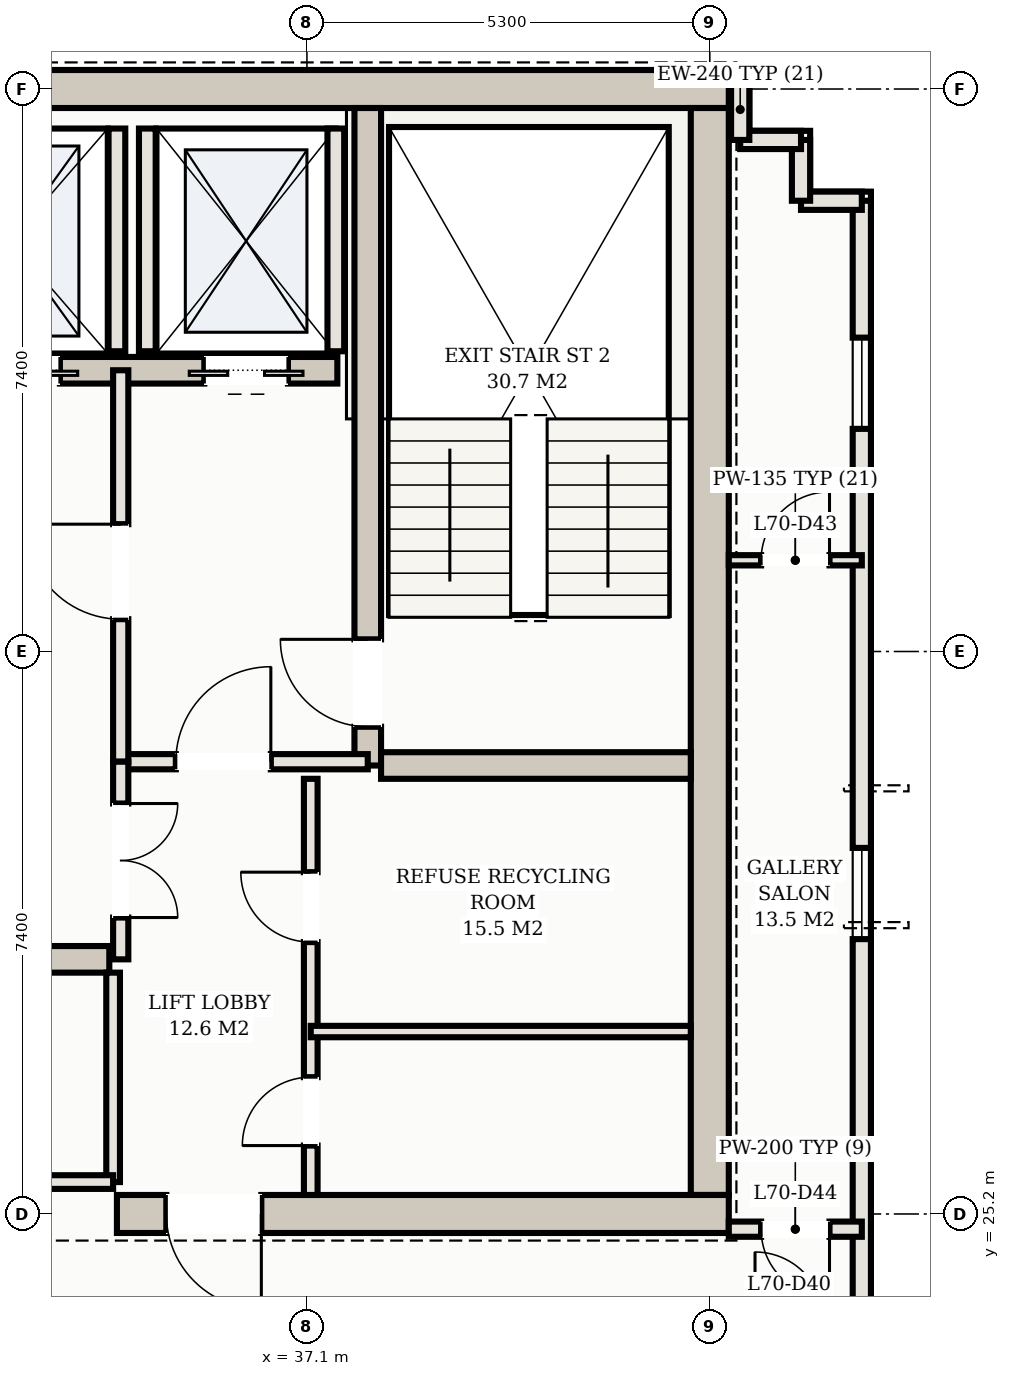
"""IFC4 building model, lengths in metres.
Left out: names, types, materials, properties, quantities, classifications, styles, units other than length and angle.
Written with IfcOpenShell. Run it as: python <this file> out.ifc"""

import sys

from ifc_helpers import new_model, si_unit, direction, frame, frame_2d, origin, place, context, subcontext, project, spatial, rectangle, extrude, element, fill, save


model = new_model("IFC4")
c1 = context("Model", 3, precision=1e-05, world=origin(), true_north=direction((0.0, 1.0)))
c2 = subcontext(c1, "Body", "Model", "MODEL_VIEW")
j1 = project(units=[si_unit("LENGTHUNIT", "METRE"), si_unit("PLANEANGLEUNIT", "RADIAN")], contexts=[c1])
p1 = place(None, origin())
s1 = spatial("IfcSite", under=j1, at=p1, CompositionType="ELEMENT")
p2 = place(p1, origin())
s2 = spatial("IfcBuilding", under=s1, at=p2, CompositionType="ELEMENT")
p3 = place(p2, frame((0.0, 0.0, 252.8)))
s3 = spatial("IfcBuildingStorey", under=s2, at=p3, CompositionType="ELEMENT", Elevation=252.8)
p4 = place(p3, frame((10.35, 40.0, 0.0), z_axis=(0.0, 0.0, 1.0), x_axis=(1.0, 0.0, 0.0)))
e1 = element("IfcWall", 1, at=p4, inside=s3, PredefinedType="SHEAR", context=c2, shape_type="SweptSolid", body=[
    extrude(rectangle(XDim=32.3, YDim=0.5, at=frame_2d((16.15, 0.0))), origin(), (0.0, 0.0, 1.0), 3.11),
])
p5 = place(p3, frame((42.4, 25.45, 0.0), z_axis=(0.0, 0.0, 1.0), x_axis=(0.0, 1.0, 0.0)))
e2 = element("IfcWall", 2, at=p5, inside=s3, PredefinedType="SHEAR", context=c2, shape_type="SweptSolid", body=[
    extrude(rectangle(XDim=14.3, YDim=0.5, at=frame_2d((7.15, 0.0))), origin(), (0.0, 0.0, 1.0), 3.11),
])
p6 = place(p3, frame((34.6, 25.2, 0.0), z_axis=(0.0, 0.0, 1.0), x_axis=(1.0, 0.0, 0.0)))
e3 = element("IfcWall", 3, at=p6, inside=s3, PredefinedType="SHEAR", context=c2, shape_type="SweptSolid", body=[
    extrude(rectangle(XDim=8.05, YDim=0.5, at=frame_2d((4.025, 0.0))), origin(), (0.0, 0.0, 1.0), 3.11),
])
p7 = place(p6, frame((0.65, 0.0, 0.0)))
e4 = element("IfcOpeningElement", 4, at=p7, cuts=e3, PredefinedType="OPENING", context=c2, shape_type="SweptSolid", body=[
    extrude(rectangle(XDim=1.25, YDim=2.2, at=frame_2d((0.625, 1.1))), frame((0.0, 0.26, 0.0), z_axis=(0.0, -1.0, 0.0), x_axis=(1.0, 0.0, 0.0)), (0.0, 0.0, 1.0), 0.52),
])
p8 = place(p3, frame((37.9, 31.1, 0.0), z_axis=(0.0, 0.0, 1.0), x_axis=(0.0, 1.0, 0.0)))
e5 = element("IfcWall", 5, at=p8, inside=s3, PredefinedType="SHEAR", context=c2, shape_type="SweptSolid", body=[
    extrude(rectangle(XDim=8.65, YDim=0.35, at=frame_2d((4.325, 0.0))), origin(), (0.0, 0.0, 1.0), 3.11),
])
p9 = place(p8, frame((0.51, 0.0, 0.0)))
e6 = element("IfcOpeningElement", 6, at=p9, cuts=e5, PredefinedType="OPENING", context=c2, shape_type="SweptSolid", body=[
    extrude(rectangle(XDim=1.15, YDim=2.2, at=frame_2d((0.575, 1.1))), frame((0.0, 0.185, 0.0), z_axis=(0.0, -1.0, 0.0), x_axis=(1.0, 0.0, 0.0)), (0.0, 0.0, 1.0), 0.37),
])
p10 = place(p3, frame((38.075, 31.1, 0.0), z_axis=(0.0, 0.0, 1.0), x_axis=(1.0, 0.0, 0.0)))
e7 = element("IfcWall", 7, at=p10, inside=s3, PredefinedType="SHEAR", context=c2, shape_type="SweptSolid", body=[
    extrude(rectangle(XDim=4.075, YDim=0.35, at=frame_2d((2.038, 0.0))), origin(), (0.0, 0.0, 1.0), 3.11),
])
p11 = place(p3, frame((15.5, 36.3, 0.0), z_axis=(0.0, 0.0, 1.0), x_axis=(1.0, 0.0, 0.0)))
e8 = element("IfcWall", 8, at=p11, inside=s3, PredefinedType="SHEAR", context=c2, shape_type="SweptSolid", body=[
    extrude(rectangle(XDim=22.0, YDim=0.35, at=frame_2d((11.0, 0.0))), origin(), (0.0, 0.0, 1.0), 3.11),
])
p12 = place(p11, frame((0.65, 0.0, 0.0)))
e9 = element("IfcOpeningElement", 9, at=p12, cuts=e8, PredefinedType="OPENING", context=c2, shape_type="SweptSolid", body=[
    extrude(rectangle(XDim=1.1, YDim=2.15, at=frame_2d((0.55, 1.075))), frame((0.0, 0.185, 0.0), z_axis=(0.0, -1.0, 0.0), x_axis=(1.0, 0.0, 0.0)), (0.0, 0.0, 1.0), 0.37),
])
p13 = place(p11, frame((20.25, 0.0, 0.0)))
e10 = element("IfcOpeningElement", 10, at=p13, cuts=e8, PredefinedType="OPENING", context=c2, shape_type="SweptSolid", body=[
    extrude(rectangle(XDim=1.1, YDim=2.15, at=frame_2d((0.55, 1.075))), frame((0.0, 0.185, 0.0), z_axis=(0.0, -1.0, 0.0), x_axis=(1.0, 0.0, 0.0)), (0.0, 0.0, 1.0), 0.37),
])
p14 = place(p11, frame((17.05, 0.0, 0.0)))
e11 = element("IfcOpeningElement", 11, at=p14, cuts=e8, PredefinedType="OPENING", context=c2, shape_type="SweptSolid", body=[
    extrude(rectangle(XDim=1.3, YDim=2.2, at=frame_2d((0.65, 1.1))), frame((0.0, 0.185, 0.0), z_axis=(0.0, -1.0, 0.0), x_axis=(1.0, 0.0, 0.0)), (0.0, 0.0, 1.0), 0.37),
])
p15 = place(p11, frame((3.95, 0.0, 0.0)))
e12 = element("IfcOpeningElement", 12, at=p15, cuts=e8, PredefinedType="OPENING", context=c2, shape_type="SweptSolid", body=[
    extrude(rectangle(XDim=1.1, YDim=2.15, at=frame_2d((0.55, 1.075))), frame((0.0, 0.185, 0.0), z_axis=(0.0, -1.0, 0.0), x_axis=(1.0, 0.0, 0.0)), (0.0, 0.0, 1.0), 0.37),
])
p16 = place(p11, frame((6.55, 0.0, 0.0)))
e13 = element("IfcOpeningElement", 13, at=p16, cuts=e8, PredefinedType="OPENING", context=c2, shape_type="SweptSolid", body=[
    extrude(rectangle(XDim=1.1, YDim=2.15, at=frame_2d((0.55, 1.075))), frame((0.0, 0.185, 0.0), z_axis=(0.0, -1.0, 0.0), x_axis=(1.0, 0.0, 0.0)), (0.0, 0.0, 1.0), 0.37),
])
p17 = place(p11, frame((9.15, 0.0, 0.0)))
e14 = element("IfcOpeningElement", 14, at=p17, cuts=e8, PredefinedType="OPENING", context=c2, shape_type="SweptSolid", body=[
    extrude(rectangle(XDim=1.1, YDim=2.15, at=frame_2d((0.55, 1.075))), frame((0.0, 0.185, 0.0), z_axis=(0.0, -1.0, 0.0), x_axis=(1.0, 0.0, 0.0)), (0.0, 0.0, 1.0), 0.37),
])
p18 = place(p3, frame((18.5, 28.55, 0.0), z_axis=(0.0, 0.0, 1.0), x_axis=(1.0, 0.0, 0.0)))
e15 = element("IfcWall", 15, at=p18, inside=s3, PredefinedType="SHEAR", context=c2, shape_type="SweptSolid", body=[
    extrude(rectangle(XDim=16.0, YDim=0.35, at=frame_2d((8.0, 0.0))), origin(), (0.0, 0.0, 1.0), 3.11),
])
for number, where, z_axis, x_axis in (
    (16, (35.0, 36.55, 0.0), (0.0, 0.0, 1.0), (0.0, 1.0, 0.0)),
    (17, (37.48, 36.55, 0.0), (0.0, 0.0, 1.0), (0.0, 1.0, 0.0)),
    (18, (34.6, 36.55, 0.0), (0.0, 0.0, 1.0), (0.0, 1.0, 0.0)),
):
    element("IfcWall", number, at=place(p3, frame(where, z_axis=z_axis, x_axis=x_axis)), inside=s3, PredefinedType="SOLIDWALL", context=c2, shape_type="SweptSolid", body=[
        extrude(rectangle(XDim=2.93, YDim=0.22, at=frame_2d((1.465, 0.0))), origin(), (0.0, 0.0, 1.0), 3.11),
    ])
p19 = place(p3, frame((44.4, 12.52, 0.0), z_axis=(0.0, 0.0, 1.0), x_axis=(0.0, 1.0, 0.0)))
e19 = element("IfcWall", 19, at=p19, inside=s3, PredefinedType="SOLIDWALL", context=c2, shape_type="SweptSolid", body=[
    extrude(rectangle(XDim=26.01, YDim=0.24, at=frame_2d((13.005, 0.0))), origin(), (0.0, 0.0, 1.0), 3.11),
])
p20 = place(p19, frame((4.48, 0.0, 0.0)))
e20 = element("IfcOpeningElement", 20, at=p20, cuts=e19, PredefinedType="OPENING", context=c2, shape_type="SweptSolid", body=[
    extrude(rectangle(XDim=1.8, YDim=2.2, at=frame_2d((0.9, 1.1))), frame((0.0, 0.13, 0.0), z_axis=(0.0, -1.0, 0.0), x_axis=(1.0, 0.0, 0.0)), (0.0, 0.0, 1.0), 0.26),
])
p21 = place(p19, frame((0.426, 0.0, 0.75)))
e21 = element("IfcOpeningElement", 21, at=p21, cuts=e19, PredefinedType="OPENING", context=c2, shape_type="SweptSolid", body=[
    extrude(rectangle(XDim=1.5, YDim=1.6, at=frame_2d((0.75, 0.8))), frame((0.0, 0.13, 0.0), z_axis=(0.0, -1.0, 0.0), x_axis=(1.0, 0.0, 0.0)), (0.0, 0.0, 1.0), 0.26),
])
p22 = place(p19, frame((2.784, 0.0, 0.75)))
e22 = element("IfcOpeningElement", 22, at=p22, cuts=e19, PredefinedType="OPENING", context=c2, shape_type="SweptSolid", body=[
    extrude(rectangle(XDim=1.2, YDim=1.5, at=frame_2d((0.6, 0.75))), frame((0.0, 0.13, 0.0), z_axis=(0.0, -1.0, 0.0), x_axis=(1.0, 0.0, 0.0)), (0.0, 0.0, 1.0), 0.26),
])
p23 = place(p19, frame((8.16, 0.0, 0.75)))
e23 = element("IfcOpeningElement", 23, at=p23, cuts=e19, PredefinedType="OPENING", context=c2, shape_type="SweptSolid", body=[
    extrude(rectangle(XDim=1.2, YDim=1.5, at=frame_2d((0.6, 0.75))), frame((0.0, 0.13, 0.0), z_axis=(0.0, -1.0, 0.0), x_axis=(1.0, 0.0, 0.0)), (0.0, 0.0, 1.0), 0.26),
])
p24 = place(p19, frame((16.296, 0.0, 0.75)))
e24 = element("IfcOpeningElement", 24, at=p24, cuts=e19, PredefinedType="OPENING", context=c2, shape_type="SweptSolid", body=[
    extrude(rectangle(XDim=1.2, YDim=1.5, at=frame_2d((0.6, 0.75))), frame((0.0, 0.13, 0.0), z_axis=(0.0, -1.0, 0.0), x_axis=(1.0, 0.0, 0.0)), (0.0, 0.0, 1.0), 0.26),
])
p25 = place(p19, frame((23.009, 0.0, 0.75)))
e25 = element("IfcOpeningElement", 25, at=p25, cuts=e19, PredefinedType="OPENING", context=c2, shape_type="SweptSolid", body=[
    extrude(rectangle(XDim=1.2, YDim=1.5, at=frame_2d((0.6, 0.75))), frame((0.0, 0.13, 0.0), z_axis=(0.0, -1.0, 0.0), x_axis=(1.0, 0.0, 0.0)), (0.0, 0.0, 1.0), 0.26),
])
p26 = place(p3, frame((44.4, 38.53, 0.0), z_axis=(0.0, 0.0, 1.0), x_axis=(-1.0, 0.0, 0.0)))
e26 = element("IfcWall", 26, at=p26, inside=s3, PredefinedType="SOLIDWALL", context=c2, shape_type="SweptSolid", body=[
    extrude(rectangle(XDim=0.8, YDim=0.24, at=frame_2d((0.4, 0.0))), origin(), (0.0, 0.0, 1.0), 3.11),
])
for number, where, z_axis, x_axis in (
    (27, (43.6, 38.53, 0.0), (0.0, 0.0, 1.0), (0.0, 1.0, 0.0)),
    (28, (43.6, 39.33, 0.0), (0.0, 0.0, 1.0), (-1.0, 0.0, 0.0)),
):
    element("IfcWall", number, at=place(p3, frame(where, z_axis=z_axis, x_axis=x_axis)), inside=s3, PredefinedType="SOLIDWALL", context=c2, shape_type="SweptSolid", body=[
        extrude(rectangle(XDim=0.8, YDim=0.24, at=frame_2d((0.4, 0.0))), origin(), (0.0, 0.0, 1.0), 3.11),
    ])
p27 = place(p3, frame((42.8, 39.33, 0.0), z_axis=(0.0, 0.0, 1.0), x_axis=(0.0, 1.0, 0.0)))
e29 = element("IfcWall", 29, at=p27, inside=s3, PredefinedType="SOLIDWALL", context=c2, shape_type="SweptSolid", body=[
    extrude(rectangle(XDim=0.8, YDim=0.24, at=frame_2d((0.4, 0.0))), origin(), (0.0, 0.0, 1.0), 3.11),
])
p28 = place(p3, frame((34.65, 31.15, 0.0), z_axis=(0.0, 0.0, 1.0), x_axis=(1.0, 0.0, 0.0)))
e30 = element("IfcWall", 30, at=p28, inside=s3, PredefinedType="PARTITIONING", context=c2, shape_type="SweptSolid", body=[
    extrude(rectangle(XDim=3.25, YDim=0.2, at=frame_2d((1.625, 0.0))), origin(), (0.0, 0.0, 1.0), 2.45),
])
p29 = place(p28, frame((0.725, 0.0, 0.0)))
e31 = element("IfcOpeningElement", 31, at=p29, cuts=e30, PredefinedType="OPENING", context=c2, shape_type="SweptSolid", body=[
    extrude(rectangle(XDim=1.25, YDim=2.2, at=frame_2d((0.625, 1.1))), frame((0.0, 0.11, 0.0), z_axis=(0.0, -1.0, 0.0), x_axis=(1.0, 0.0, 0.0)), (0.0, 0.0, 1.0), 0.22),
])
p30 = place(p3, frame((34.65, 31.15, 0.0), z_axis=(0.0, 0.0, 1.0), x_axis=(0.0, 1.0, 0.0)))
e32 = element("IfcWall", 32, at=p30, inside=s3, PredefinedType="PARTITIONING", context=c2, shape_type="SweptSolid", body=[
    extrude(rectangle(XDim=5.15, YDim=0.2, at=frame_2d((2.575, 0.0))), origin(), (0.0, 0.0, 1.0), 2.45),
])
p31 = place(p30, frame((1.875, 0.0, 0.0)))
e33 = element("IfcOpeningElement", 33, at=p31, cuts=e32, PredefinedType="OPENING", context=c2, shape_type="SweptSolid", body=[
    extrude(rectangle(XDim=1.25, YDim=2.2, at=frame_2d((0.625, 1.1))), frame((0.0, 0.11, 0.0), z_axis=(0.0, -1.0, 0.0), x_axis=(1.0, 0.0, 0.0)), (0.0, 0.0, 1.0), 0.22),
])
p32 = place(p3, frame((37.15, 25.45, 0.0), z_axis=(0.0, 0.0, 1.0), x_axis=(0.0, 1.0, 0.0)))
e34 = element("IfcWall", 34, at=p32, inside=s3, PredefinedType="PARTITIONING", context=c2, shape_type="SweptSolid", body=[
    extrude(rectangle(XDim=5.475, YDim=0.18, at=frame_2d((2.738, 0.0))), origin(), (0.0, 0.0, 1.0), 2.45),
])
p33 = place(p32, frame((0.65, 0.0, 0.0)))
e35 = element("IfcOpeningElement", 35, at=p33, cuts=e34, PredefinedType="OPENING", context=c2, shape_type="SweptSolid", body=[
    extrude(rectangle(XDim=0.9, YDim=2.15, at=frame_2d((0.45, 1.075))), frame((0.0, 0.1, 0.0), z_axis=(0.0, -1.0, 0.0), x_axis=(1.0, 0.0, 0.0)), (0.0, 0.0, 1.0), 0.2),
])
p34 = place(p32, frame((3.327, 0.0, 0.0)))
e36 = element("IfcOpeningElement", 36, at=p34, cuts=e34, PredefinedType="OPENING", context=c2, shape_type="SweptSolid", body=[
    extrude(rectangle(XDim=0.92, YDim=2.15, at=frame_2d((0.46, 1.075))), frame((0.0, 0.1, 0.0), z_axis=(0.0, -1.0, 0.0), x_axis=(1.0, 0.0, 0.0)), (0.0, 0.0, 1.0), 0.2),
])
p35 = place(p3, frame((37.15, 27.6, 0.0), z_axis=(0.0, 0.0, 1.0), x_axis=(1.0, 0.0, 0.0)))
e37 = element("IfcWall", 37, at=p35, inside=s3, PredefinedType="PARTITIONING", context=c2, shape_type="SweptSolid", body=[
    extrude(rectangle(XDim=5.0, YDim=0.15, at=frame_2d((2.5, 0.0))), origin(), (0.0, 0.0, 1.0), 2.45),
])
p36 = place(p3, frame((34.65, 28.55, 0.0), z_axis=(0.0, 0.0, 1.0), x_axis=(0.0, 1.0, 0.0)))
e38 = element("IfcWall", 38, at=p36, inside=s3, PredefinedType="PARTITIONING", context=c2, shape_type="SweptSolid", body=[
    extrude(rectangle(XDim=2.6, YDim=0.2, at=frame_2d((1.3, 0.0))), origin(), (0.0, 0.0, 1.0), 2.45),
])
p37 = place(p36, frame((0.55, 0.0, 0.0)))
e39 = element("IfcOpeningElement", 39, at=p37, cuts=e38, PredefinedType="OPENING", context=c2, shape_type="SweptSolid", body=[
    extrude(rectangle(XDim=1.5, YDim=2.25, at=frame_2d((0.75, 1.125))), frame((0.0, 0.11, 0.0), z_axis=(0.0, -1.0, 0.0), x_axis=(1.0, 0.0, 0.0)), (0.0, 0.0, 1.0), 0.22),
])
p38 = place(p3, frame((34.55, 25.62, 0.0), z_axis=(0.0, 0.0, 1.0), x_axis=(0.0, 1.0, 0.0)))
e40 = element("IfcWall", 40, at=p38, inside=s3, PredefinedType="PARTITIONING", context=c2, shape_type="SweptSolid", body=[
    extrude(rectangle(XDim=2.755, YDim=0.18, at=frame_2d((1.377, 0.0))), origin(), (0.0, 0.0, 1.0), 2.45),
])
p39 = place(p3, frame((26.65, 25.62, 0.0), z_axis=(0.0, 0.0, 1.0), x_axis=(1.0, 0.0, 0.0)))
e41 = element("IfcWall", 41, at=p39, inside=s3, PredefinedType="PARTITIONING", context=c2, shape_type="SweptSolid", body=[
    extrude(rectangle(XDim=7.9, YDim=0.18, at=frame_2d((3.95, 0.0))), origin(), (0.0, 0.0, 1.0), 2.45),
])
p40 = place(p39, frame((3.34, 0.0, 0.0)))
e42 = element("IfcOpeningElement", 42, at=p40, cuts=e41, PredefinedType="OPENING", context=c2, shape_type="SweptSolid", body=[
    extrude(rectangle(XDim=0.92, YDim=2.15, at=frame_2d((0.46, 1.075))), frame((0.0, 0.1, 0.0), z_axis=(0.0, -1.0, 0.0), x_axis=(1.0, 0.0, 0.0)), (0.0, 0.0, 1.0), 0.2),
])
p41 = place(p3, frame((42.65, 25.0, 0.0), z_axis=(0.0, 0.0, 1.0), x_axis=(1.0, 0.0, 0.0)))
e43 = element("IfcWall", 43, at=p41, inside=s3, PredefinedType="PARTITIONING", context=c2, shape_type="SweptSolid", body=[
    extrude(rectangle(XDim=1.75, YDim=0.2, at=frame_2d((0.875, 0.0))), origin(), (0.0, 0.0, 1.0), 2.45),
])
p42 = place(p41, frame((0.425, 0.0, 0.0)))
e44 = element("IfcOpeningElement", 44, at=p42, cuts=e43, PredefinedType="OPENING", context=c2, shape_type="SweptSolid", body=[
    extrude(rectangle(XDim=0.9, YDim=2.15, at=frame_2d((0.45, 1.075))), frame((0.0, 0.11, 0.0), z_axis=(0.0, -1.0, 0.0), x_axis=(1.0, 0.0, 0.0)), (0.0, 0.0, 1.0), 0.22),
])
p43 = place(p3, frame((42.65, 33.8, 0.0), z_axis=(0.0, 0.0, 1.0), x_axis=(1.0, 0.0, 0.0)))
e45 = element("IfcWall", 45, at=p43, inside=s3, PredefinedType="PARTITIONING", context=c2, shape_type="SweptSolid", body=[
    extrude(rectangle(XDim=1.75, YDim=0.135, at=frame_2d((0.875, 0.0))), origin(), (0.0, 0.0, 1.0), 2.45),
])
p44 = place(p43, frame((0.425, 0.0, 0.0)))
e46 = element("IfcOpeningElement", 46, at=p44, cuts=e45, PredefinedType="OPENING", context=c2, shape_type="SweptSolid", body=[
    extrude(rectangle(XDim=0.9, YDim=2.15, at=frame_2d((0.45, 1.075))), frame((0.0, 0.078, 0.0), z_axis=(0.0, -1.0, 0.0), x_axis=(1.0, 0.0, 0.0)), (0.0, 0.0, 1.0), 0.155),
])
p45 = place(p13, frame((1.1, 0.0, 0.0), z_axis=(0.0, 0.0, 1.0), x_axis=(-1.0, 0.0, 0.0)))
e47 = element("IfcDoor", 47, at=p45, inside=s3, OperationType="DOUBLE_DOOR_SLIDING", PredefinedType="DOOR", context=c2, shape_type="SweptSolid", body=[
    extrude(rectangle(XDim=1.1, YDim=2.15, at=frame_2d((0.55, 1.075))), frame((0.0, 0.025, 0.0), z_axis=(0.0, -1.0, 0.0), x_axis=(1.0, 0.0, 0.0)), (0.0, 0.0, 1.0), 0.05),
])
fill(e10, e47)
p46 = place(p14, frame((1.3, 0.0, 0.0), z_axis=(0.0, 0.0, 1.0), x_axis=(-1.0, 0.0, 0.0)))
e48 = element("IfcDoor", 48, at=p46, inside=s3, OperationType="DOUBLE_DOOR_SLIDING", PredefinedType="DOOR", context=c2, shape_type="SweptSolid", body=[
    extrude(rectangle(XDim=1.3, YDim=2.2, at=frame_2d((0.65, 1.1))), frame((0.0, 0.025, 0.0), z_axis=(0.0, -1.0, 0.0), x_axis=(1.0, 0.0, 0.0)), (0.0, 0.0, 1.0), 0.05),
])
fill(e11, e48)
p47 = place(p7, frame((1.25, 0.0, 0.0), z_axis=(0.0, 0.0, 1.0), x_axis=(-1.0, 0.0, 0.0)))
e49 = element("IfcDoor", 49, at=p47, inside=s3, OperationType="SINGLE_SWING_LEFT", PredefinedType="DOOR", context=c2, shape_type="SweptSolid", body=[
    extrude(rectangle(XDim=1.25, YDim=2.2, at=frame_2d((0.625, 1.1))), frame((0.0, 0.025, 0.0), z_axis=(0.0, -1.0, 0.0), x_axis=(1.0, 0.0, 0.0)), (0.0, 0.0, 1.0), 0.05),
])
fill(e4, e49)
p48 = place(p29, origin())
e50 = element("IfcDoor", 50, at=p48, inside=s3, OperationType="SINGLE_SWING_RIGHT", PredefinedType="DOOR", context=c2, shape_type="SweptSolid", body=[
    extrude(rectangle(XDim=1.25, YDim=2.2, at=frame_2d((0.625, 1.1))), frame((0.0, 0.025, 0.0), z_axis=(0.0, -1.0, 0.0), x_axis=(1.0, 0.0, 0.0)), (0.0, 0.0, 1.0), 0.05),
])
fill(e31, e50)
p49 = place(p31, origin())
e51 = element("IfcDoor", 51, at=p49, inside=s3, OperationType="SINGLE_SWING_RIGHT", PredefinedType="DOOR", context=c2, shape_type="SweptSolid", body=[
    extrude(rectangle(XDim=1.25, YDim=2.2, at=frame_2d((0.625, 1.1))), frame((0.0, 0.025, 0.0), z_axis=(0.0, -1.0, 0.0), x_axis=(1.0, 0.0, 0.0)), (0.0, 0.0, 1.0), 0.05),
])
fill(e33, e51)
p50 = place(p9, origin())
e52 = element("IfcDoor", 52, at=p50, inside=s3, OperationType="SINGLE_SWING_RIGHT", PredefinedType="DOOR", context=c2, shape_type="SweptSolid", body=[
    extrude(rectangle(XDim=1.15, YDim=2.2, at=frame_2d((0.575, 1.1))), frame((0.0, 0.025, 0.0), z_axis=(0.0, -1.0, 0.0), x_axis=(1.0, 0.0, 0.0)), (0.0, 0.0, 1.0), 0.05),
])
fill(e6, e52)
p51 = place(p33, origin())
e53 = element("IfcDoor", 53, at=p51, inside=s3, OperationType="SINGLE_SWING_LEFT", PredefinedType="DOOR", context=c2, shape_type="SweptSolid", body=[
    extrude(rectangle(XDim=0.9, YDim=2.15, at=frame_2d((0.45, 1.075))), frame((0.0, 0.025, 0.0), z_axis=(0.0, -1.0, 0.0), x_axis=(1.0, 0.0, 0.0)), (0.0, 0.0, 1.0), 0.05),
])
fill(e35, e53)
p52 = place(p34, origin())
e54 = element("IfcDoor", 54, at=p52, inside=s3, OperationType="SINGLE_SWING_RIGHT", PredefinedType="DOOR", context=c2, shape_type="SweptSolid", body=[
    extrude(rectangle(XDim=0.92, YDim=2.15, at=frame_2d((0.46, 1.075))), frame((0.0, 0.025, 0.0), z_axis=(0.0, -1.0, 0.0), x_axis=(1.0, 0.0, 0.0)), (0.0, 0.0, 1.0), 0.05),
])
fill(e36, e54)
p53 = place(p37, frame((1.5, 0.0, 0.0), z_axis=(0.0, 0.0, 1.0), x_axis=(-1.0, 0.0, 0.0)))
e55 = element("IfcDoor", 55, at=p53, inside=s3, OperationType="DOUBLE_DOOR_SINGLE_SWING", PredefinedType="DOOR", context=c2, shape_type="SweptSolid", body=[
    extrude(rectangle(XDim=1.5, YDim=2.25, at=frame_2d((0.75, 1.125))), frame((0.0, 0.025, 0.0), z_axis=(0.0, -1.0, 0.0), x_axis=(1.0, 0.0, 0.0)), (0.0, 0.0, 1.0), 0.05),
])
fill(e39, e55)
p54 = place(p44, origin())
e56 = element("IfcDoor", 56, at=p54, inside=s3, OperationType="SINGLE_SWING_RIGHT", PredefinedType="DOOR", context=c2, shape_type="SweptSolid", body=[
    extrude(rectangle(XDim=0.9, YDim=2.15, at=frame_2d((0.45, 1.075))), frame((0.0, 0.025, 0.0), z_axis=(0.0, -1.0, 0.0), x_axis=(1.0, 0.0, 0.0)), (0.0, 0.0, 1.0), 0.05),
])
fill(e46, e56)
p55 = place(p42, frame((0.9, 0.0, 0.0), z_axis=(0.0, 0.0, 1.0), x_axis=(-1.0, 0.0, 0.0)))
e57 = element("IfcDoor", 57, at=p55, inside=s3, OperationType="SINGLE_SWING_LEFT", PredefinedType="DOOR", context=c2, shape_type="SweptSolid", body=[
    extrude(rectangle(XDim=0.9, YDim=2.15, at=frame_2d((0.45, 1.075))), frame((0.0, 0.025, 0.0), z_axis=(0.0, -1.0, 0.0), x_axis=(1.0, 0.0, 0.0)), (0.0, 0.0, 1.0), 0.05),
])
fill(e44, e57)
p56 = place(p24, origin())
e58 = element("IfcWindow", 58, at=p56, inside=s3, PartitioningType="SINGLE_PANEL", PredefinedType="WINDOW", context=c2, shape_type="SweptSolid", body=[
    extrude(rectangle(XDim=1.2, YDim=1.5, at=frame_2d((0.6, 0.75))), frame((0.0, 0.03, 0.0), z_axis=(0.0, -1.0, 0.0), x_axis=(1.0, 0.0, 0.0)), (0.0, 0.0, 1.0), 0.06),
])
fill(e24, e58)
p57 = place(p25, origin())
e59 = element("IfcWindow", 59, at=p57, inside=s3, PartitioningType="SINGLE_PANEL", PredefinedType="WINDOW", context=c2, shape_type="SweptSolid", body=[
    extrude(rectangle(XDim=1.2, YDim=1.5, at=frame_2d((0.6, 0.75))), frame((0.0, 0.03, 0.0), z_axis=(0.0, -1.0, 0.0), x_axis=(1.0, 0.0, 0.0)), (0.0, 0.0, 1.0), 0.06),
])
fill(e25, e59)
save(model, sys.argv[1])
